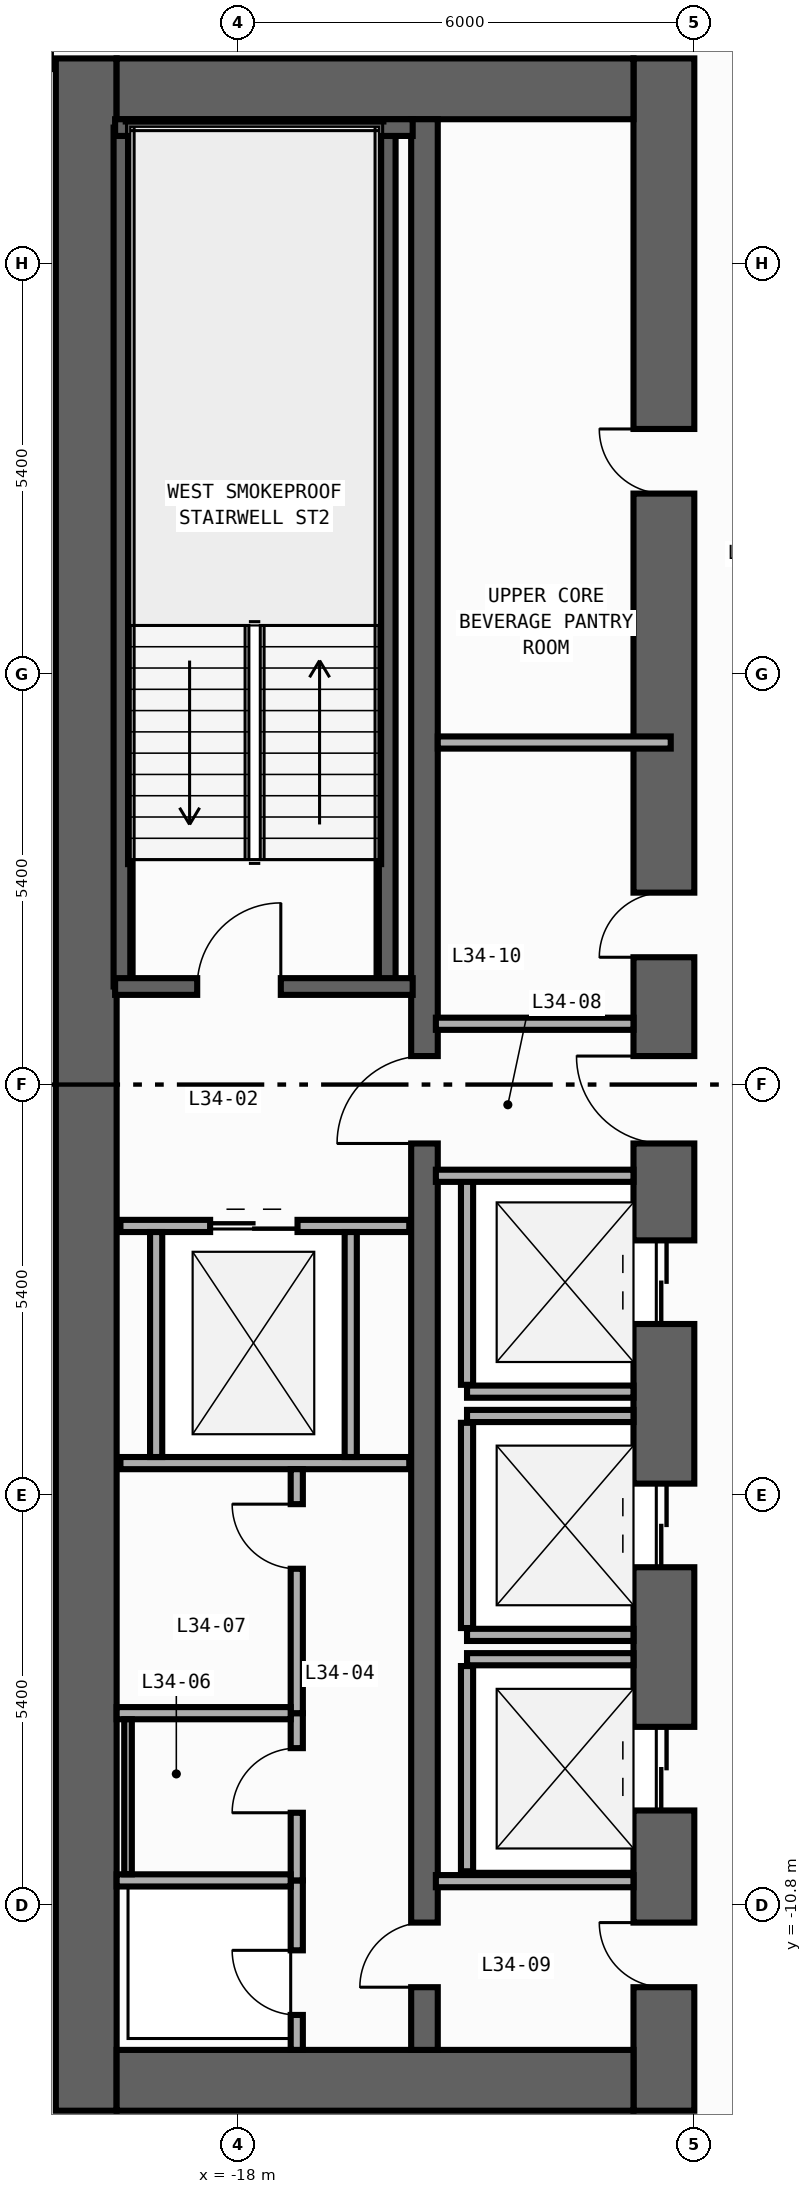
"""IFC4 building model, lengths in metres.
Left out: names, types, materials, properties, quantities, classifications, styles, units other than length and angle.
Written with IfcOpenShell. Run it as: python <this file> out.ifc"""

import sys

from ifc_helpers import new_model, si_unit, direction, frame, frame_2d, origin, place, context, subcontext, project, spatial, rectangle, extrude, element, fill, save


model = new_model("IFC4")
c1 = context("Model", 3, precision=1e-05, world=origin(), true_north=direction((0.0, 1.0)))
c2 = subcontext(c1, "Body", "Model", "MODEL_VIEW")
j1 = project(units=[si_unit("LENGTHUNIT", "METRE"), si_unit("PLANEANGLEUNIT", "RADIAN")], contexts=[c1])
p1 = place(None, origin())
s1 = spatial("IfcSite", under=j1, at=p1, CompositionType="ELEMENT")
p2 = place(p1, origin())
s2 = spatial("IfcBuilding", under=s1, at=p2, CompositionType="ELEMENT")
p3 = place(p2, frame((0.0, 0.0, 147.8)))
s3 = spatial("IfcBuildingStorey", under=s2, at=p3, CompositionType="ELEMENT", Elevation=147.8)
p4 = place(p3, frame((-20.0, -13.5, 0.0), z_axis=(0.0, 0.0, 1.0), x_axis=(0.0, 1.0, 0.0)))
e1 = element("IfcWall", 1, at=p4, inside=s3, PredefinedType="SHEAR", context=c2, shape_type="SweptSolid", body=[
    extrude(rectangle(XDim=27.0, YDim=0.8, at=frame_2d((13.5, 0.0))), origin(), (0.0, 0.0, 1.0), 3.85),
])
p5 = place(p3, frame((-12.4, -13.5, 0.0), z_axis=(0.0, 0.0, 1.0), x_axis=(0.0, 1.0, 0.0)))
e2 = element("IfcWall", 2, at=p5, inside=s3, PredefinedType="SHEAR", context=c2, shape_type="SweptSolid", body=[
    extrude(rectangle(XDim=27.0, YDim=0.8, at=frame_2d((13.5, 0.0))), origin(), (0.0, 0.0, 1.0), 3.85),
])
p6 = place(p5, frame((10.35, 0.0, 0.0)))
e3 = element("IfcOpeningElement", 3, at=p6, cuts=e2, PredefinedType="OPENING", context=c2, shape_type="SweptSolid", body=[
    extrude(rectangle(XDim=1.1, YDim=2.2, at=frame_2d((0.55, 1.1))), frame((0.0, 0.41, 0.0), z_axis=(0.0, -1.0, 0.0), x_axis=(1.0, 0.0, 0.0)), (0.0, 0.0, 1.0), 0.82),
])
p7 = place(p5, frame((7.15, 0.0, 0.0)))
e4 = element("IfcOpeningElement", 4, at=p7, cuts=e2, PredefinedType="OPENING", context=c2, shape_type="SweptSolid", body=[
    extrude(rectangle(XDim=1.1, YDim=2.2, at=frame_2d((0.55, 1.1))), frame((0.0, 0.41, 0.0), z_axis=(0.0, -1.0, 0.0), x_axis=(1.0, 0.0, 0.0)), (0.0, 0.0, 1.0), 0.82),
])
p8 = place(p5, frame((3.95, 0.0, 0.0)))
e5 = element("IfcOpeningElement", 5, at=p8, cuts=e2, PredefinedType="OPENING", context=c2, shape_type="SweptSolid", body=[
    extrude(rectangle(XDim=1.1, YDim=2.2, at=frame_2d((0.55, 1.1))), frame((0.0, 0.41, 0.0), z_axis=(0.0, -1.0, 0.0), x_axis=(1.0, 0.0, 0.0)), (0.0, 0.0, 1.0), 0.82),
])
p9 = place(p5, frame((15.175, 0.0, 0.0)))
e6 = element("IfcOpeningElement", 6, at=p9, cuts=e2, PredefinedType="OPENING", context=c2, shape_type="SweptSolid", body=[
    extrude(rectangle(XDim=0.85, YDim=2.1, at=frame_2d((0.425, 1.05))), frame((0.0, 0.41, 0.0), z_axis=(0.0, -1.0, 0.0), x_axis=(1.0, 0.0, 0.0)), (0.0, 0.0, 1.0), 0.82),
])
p10 = place(p5, frame((21.275, 0.0, 0.0)))
e7 = element("IfcOpeningElement", 7, at=p10, cuts=e2, PredefinedType="OPENING", context=c2, shape_type="SweptSolid", body=[
    extrude(rectangle(XDim=0.85, YDim=2.1, at=frame_2d((0.425, 1.05))), frame((0.0, 0.41, 0.0), z_axis=(0.0, -1.0, 0.0), x_axis=(1.0, 0.0, 0.0)), (0.0, 0.0, 1.0), 0.82),
])
p11 = place(p5, frame((12.725, 0.0, 0.0)))
e8 = element("IfcOpeningElement", 8, at=p11, cuts=e2, PredefinedType="OPENING", context=c2, shape_type="SweptSolid", body=[
    extrude(rectangle(XDim=1.15, YDim=2.2, at=frame_2d((0.575, 1.1))), frame((0.0, 0.41, 0.0), z_axis=(0.0, -1.0, 0.0), x_axis=(1.0, 0.0, 0.0)), (0.0, 0.0, 1.0), 0.82),
])
p12 = place(p5, frame((1.625, 0.0, 0.0)))
e9 = element("IfcOpeningElement", 9, at=p12, cuts=e2, PredefinedType="OPENING", context=c2, shape_type="SweptSolid", body=[
    extrude(rectangle(XDim=0.85, YDim=2.1, at=frame_2d((0.425, 1.05))), frame((0.0, 0.41, 0.0), z_axis=(0.0, -1.0, 0.0), x_axis=(1.0, 0.0, 0.0)), (0.0, 0.0, 1.0), 0.82),
])
for number, where, z_axis, x_axis in (
    (10, (-19.6, -13.1, 0.0), (0.0, 0.0, 1.0), (1.0, 0.0, 0.0)),
    (11, (-19.6, 13.1, 0.0), (0.0, 0.0, 1.0), (1.0, 0.0, 0.0)),
):
    element("IfcWall", number, at=place(p3, frame(where, z_axis=z_axis, x_axis=x_axis)), inside=s3, PredefinedType="SHEAR", context=c2, shape_type="SweptSolid", body=[
        extrude(rectangle(XDim=6.8, YDim=0.8, at=frame_2d((3.4, 0.0))), origin(), (0.0, 0.0, 1.0), 3.85),
    ])
p13 = place(p3, frame((-15.55, -12.7, 0.0), z_axis=(0.0, 0.0, 1.0), x_axis=(0.0, 1.0, 0.0)))
e12 = element("IfcWall", 12, at=p13, inside=s3, PredefinedType="SHEAR", context=c2, shape_type="SweptSolid", body=[
    extrude(rectangle(XDim=25.4, YDim=0.35, at=frame_2d((12.7, 0.0))), origin(), (0.0, 0.0, 1.0), 3.85),
])
p14 = place(p13, frame((11.925, 0.0, 0.0)))
e13 = element("IfcOpeningElement", 13, at=p14, cuts=e12, PredefinedType="OPENING", context=c2, shape_type="SweptSolid", body=[
    extrude(rectangle(XDim=1.15, YDim=2.2, at=frame_2d((0.575, 1.1))), frame((0.0, 0.185, 0.0), z_axis=(0.0, -1.0, 0.0), x_axis=(1.0, 0.0, 0.0)), (0.0, 0.0, 1.0), 0.37),
])
p15 = place(p13, frame((0.825, 0.0, 0.0)))
e14 = element("IfcOpeningElement", 14, at=p15, cuts=e12, PredefinedType="OPENING", context=c2, shape_type="SweptSolid", body=[
    extrude(rectangle(XDim=0.85, YDim=2.1, at=frame_2d((0.425, 1.05))), frame((0.0, 0.185, 0.0), z_axis=(0.0, -1.0, 0.0), x_axis=(1.0, 0.0, 0.0)), (0.0, 0.0, 1.0), 0.37),
])
for number, where, z_axis, x_axis in (
    (15, (-16.04, 1.29, 0.0), (0.0, 0.0, 1.0), (0.0, 1.0, 0.0)),
    (16, (-19.53, 1.29, 0.0), (0.0, 0.0, 1.0), (0.0, 1.0, 0.0)),
):
    element("IfcWall", number, at=place(p3, frame(where, z_axis=z_axis, x_axis=x_axis)), inside=s3, PredefinedType="SHEAR", context=c2, shape_type="SweptSolid", body=[
        extrude(rectangle(XDim=11.3, YDim=0.22, at=frame_2d((5.65, 0.0))), origin(), (0.0, 0.0, 1.0), 3.85),
    ])
p16 = place(p3, frame((-19.62, 12.59, 0.0), z_axis=(0.0, 0.0, 1.0), x_axis=(1.0, 0.0, 0.0)))
e17 = element("IfcWall", 17, at=p16, inside=s3, PredefinedType="SHEAR", context=c2, shape_type="SweptSolid", body=[
    extrude(rectangle(XDim=3.915, YDim=0.22, at=frame_2d((1.958, 0.0))), origin(), (0.0, 0.0, 1.0), 3.85),
])
p17 = place(p3, frame((-19.62, 1.29, 0.0), z_axis=(0.0, 0.0, 1.0), x_axis=(1.0, 0.0, 0.0)))
e18 = element("IfcWall", 18, at=p17, inside=s3, PredefinedType="SHEAR", context=c2, shape_type="SweptSolid", body=[
    extrude(rectangle(XDim=3.915, YDim=0.22, at=frame_2d((1.958, 0.0))), origin(), (0.0, 0.0, 1.0), 3.85),
])
p18 = place(p17, frame((1.08, 0.0, 0.0)))
e19 = element("IfcOpeningElement", 19, at=p18, cuts=e18, PredefinedType="OPENING", context=c2, shape_type="SweptSolid", body=[
    extrude(rectangle(XDim=1.1, YDim=2.2, at=frame_2d((0.55, 1.1))), frame((0.0, 0.12, 0.0), z_axis=(0.0, -1.0, 0.0), x_axis=(1.0, 0.0, 0.0)), (0.0, 0.0, 1.0), 0.24),
])
p19 = place(p3, frame((-14.99, -4.04, 0.0), z_axis=(0.0, 0.0, 1.0), x_axis=(1.0, 0.0, 0.0)))
e20 = element("IfcWall", 20, at=p19, inside=s3, PredefinedType="STANDARD", context=c2, shape_type="SweptSolid", body=[
    extrude(rectangle(XDim=2.19, YDim=0.16, at=frame_2d((1.095, 0.0))), origin(), (0.0, 0.0, 1.0), 3.85),
])
p20 = place(p3, frame((-14.99, -3.95, 0.0), z_axis=(0.0, 0.0, 1.0), x_axis=(0.0, 1.0, 0.0)))
e21 = element("IfcWall", 21, at=p20, inside=s3, PredefinedType="STANDARD", context=c2, shape_type="SweptSolid", body=[
    extrude(rectangle(XDim=2.7, YDim=0.16, at=frame_2d((1.35, 0.0))), origin(), (0.0, 0.0, 1.0), 3.85),
])
for number, where, z_axis, x_axis in (
    (22, (-14.99, -7.24, 0.0), (0.0, 0.0, 1.0), (1.0, 0.0, 0.0)),
    (23, (-14.99, -4.36, 0.0), (0.0, 0.0, 1.0), (1.0, 0.0, 0.0)),
):
    element("IfcWall", number, at=place(p3, frame(where, z_axis=z_axis, x_axis=x_axis)), inside=s3, PredefinedType="STANDARD", context=c2, shape_type="SweptSolid", body=[
        extrude(rectangle(XDim=2.19, YDim=0.16, at=frame_2d((1.095, 0.0))), origin(), (0.0, 0.0, 1.0), 3.85),
    ])
p21 = place(p3, frame((-14.99, -7.15, 0.0), z_axis=(0.0, 0.0, 1.0), x_axis=(0.0, 1.0, 0.0)))
e24 = element("IfcWall", 24, at=p21, inside=s3, PredefinedType="STANDARD", context=c2, shape_type="SweptSolid", body=[
    extrude(rectangle(XDim=2.7, YDim=0.16, at=frame_2d((1.35, 0.0))), origin(), (0.0, 0.0, 1.0), 3.85),
])
p22 = place(p3, frame((-14.99, -7.56, 0.0), z_axis=(0.0, 0.0, 1.0), x_axis=(1.0, 0.0, 0.0)))
e25 = element("IfcWall", 25, at=p22, inside=s3, PredefinedType="STANDARD", context=c2, shape_type="SweptSolid", body=[
    extrude(rectangle(XDim=2.19, YDim=0.16, at=frame_2d((1.095, 0.0))), origin(), (0.0, 0.0, 1.0), 3.85),
])
p23 = place(p3, frame((-14.99, -10.35, 0.0), z_axis=(0.0, 0.0, 1.0), x_axis=(0.0, 1.0, 0.0)))
e26 = element("IfcWall", 26, at=p23, inside=s3, PredefinedType="STANDARD", context=c2, shape_type="SweptSolid", body=[
    extrude(rectangle(XDim=2.7, YDim=0.16, at=frame_2d((1.35, 0.0))), origin(), (0.0, 0.0, 1.0), 3.85),
])
p24 = place(p3, frame((-19.55, -1.86, 0.0), z_axis=(0.0, 0.0, 1.0), x_axis=(1.0, 0.0, 0.0)))
e27 = element("IfcWall", 27, at=p24, inside=s3, PredefinedType="STANDARD", context=c2, shape_type="SweptSolid", body=[
    extrude(rectangle(XDim=3.8, YDim=0.16, at=frame_2d((1.9, 0.0))), origin(), (0.0, 0.0, 1.0), 3.85),
])
p25 = place(p24, frame((1.18, 0.0, 0.0)))
e28 = element("IfcOpeningElement", 28, at=p25, cuts=e27, PredefinedType="OPENING", context=c2, shape_type="SweptSolid", body=[
    extrude(rectangle(XDim=1.15, YDim=2.2, at=frame_2d((0.575, 1.1))), frame((0.0, 0.09, 0.0), z_axis=(0.0, -1.0, 0.0), x_axis=(1.0, 0.0, 0.0)), (0.0, 0.0, 1.0), 0.18),
])
p26 = place(p3, frame((-19.55, -4.98, 0.0), z_axis=(0.0, 0.0, 1.0), x_axis=(1.0, 0.0, 0.0)))
e29 = element("IfcWall", 29, at=p26, inside=s3, PredefinedType="STANDARD", context=c2, shape_type="SweptSolid", body=[
    extrude(rectangle(XDim=3.8, YDim=0.16, at=frame_2d((1.9, 0.0))), origin(), (0.0, 0.0, 1.0), 3.85),
])
for number, where, z_axis, x_axis in (
    (30, (-19.08, -4.9, 0.0), (0.0, 0.0, 1.0), (0.0, 1.0, 0.0)),
    (31, (-16.52, -4.9, 0.0), (0.0, 0.0, 1.0), (0.0, 1.0, 0.0)),
):
    element("IfcWall", number, at=place(p3, frame(where, z_axis=z_axis, x_axis=x_axis)), inside=s3, PredefinedType="STANDARD", context=c2, shape_type="SweptSolid", body=[
        extrude(rectangle(XDim=2.96, YDim=0.16, at=frame_2d((1.48, 0.0))), origin(), (0.0, 0.0, 1.0), 3.85),
    ])
for number, where, z_axis, x_axis in (
    (32, (-15.4, 0.8, 0.0), (0.0, 0.0, 1.0), (1.0, 0.0, 0.0)),
    (33, (-15.4, -1.2, 0.0), (0.0, 0.0, 1.0), (1.0, 0.0, 0.0)),
    (34, (-15.4, -10.48, 0.0), (0.0, 0.0, 1.0), (1.0, 0.0, 0.0)),
):
    element("IfcWall", number, at=place(p3, frame(where, z_axis=z_axis, x_axis=x_axis)), inside=s3, PredefinedType="STANDARD", context=c2, shape_type="SweptSolid", body=[
        extrude(rectangle(XDim=2.6, YDim=0.16, at=frame_2d((1.3, 0.0))), origin(), (0.0, 0.0, 1.0), 3.85),
    ])
p27 = place(p3, frame((-17.23, -12.7, 0.0), z_axis=(0.0, 0.0, 1.0), x_axis=(0.0, 1.0, 0.0)))
e35 = element("IfcWall", 35, at=p27, inside=s3, PredefinedType="PARTITIONING", context=c2, shape_type="SweptSolid", body=[
    extrude(rectangle(XDim=2.23, YDim=0.16, at=frame_2d((1.115, 0.0))), origin(), (0.0, 0.0, 1.0), 3.85),
])
p28 = place(p27, frame((0.46, 0.0, 0.0)))
e36 = element("IfcOpeningElement", 36, at=p28, cuts=e35, PredefinedType="OPENING", context=c2, shape_type="SweptSolid", body=[
    extrude(rectangle(XDim=0.85, YDim=2.1, at=frame_2d((0.425, 1.05))), frame((0.0, 0.09, 0.0), z_axis=(0.0, -1.0, 0.0), x_axis=(1.0, 0.0, 0.0)), (0.0, 0.0, 1.0), 0.18),
])
p29 = place(p3, frame((-17.23, -10.47, 0.0), z_axis=(0.0, 0.0, 1.0), x_axis=(0.0, 1.0, 0.0)))
e37 = element("IfcWall", 37, at=p29, inside=s3, PredefinedType="PARTITIONING", context=c2, shape_type="SweptSolid", body=[
    extrude(rectangle(XDim=2.2, YDim=0.16, at=frame_2d((1.1, 0.0))), origin(), (0.0, 0.0, 1.0), 3.85),
])
p30 = place(p29, frame((0.89, 0.0, 0.0)))
e38 = element("IfcOpeningElement", 38, at=p30, cuts=e37, PredefinedType="OPENING", context=c2, shape_type="SweptSolid", body=[
    extrude(rectangle(XDim=0.85, YDim=2.1, at=frame_2d((0.425, 1.05))), frame((0.0, 0.09, 0.0), z_axis=(0.0, -1.0, 0.0), x_axis=(1.0, 0.0, 0.0)), (0.0, 0.0, 1.0), 0.18),
])
p31 = place(p3, frame((-17.23, -8.27, 0.0), z_axis=(0.0, 0.0, 1.0), x_axis=(0.0, 1.0, 0.0)))
e39 = element("IfcWall", 39, at=p31, inside=s3, PredefinedType="PARTITIONING", context=c2, shape_type="SweptSolid", body=[
    extrude(rectangle(XDim=3.21, YDim=0.16, at=frame_2d((1.605, 0.0))), origin(), (0.0, 0.0, 1.0), 3.85),
])
p32 = place(p31, frame((1.9, 0.0, 0.0)))
e40 = element("IfcOpeningElement", 40, at=p32, cuts=e39, PredefinedType="OPENING", context=c2, shape_type="SweptSolid", body=[
    extrude(rectangle(XDim=0.85, YDim=2.1, at=frame_2d((0.425, 1.05))), frame((0.0, 0.09, 0.0), z_axis=(0.0, -1.0, 0.0), x_axis=(1.0, 0.0, 0.0)), (0.0, 0.0, 1.0), 0.18),
])
for number, where, z_axis, x_axis in (
    (41, (-19.6, -10.47, 0.0), (0.0, 0.0, 1.0), (1.0, 0.0, 0.0)),
    (42, (-19.6, -8.27, 0.0), (0.0, 0.0, 1.0), (1.0, 0.0, 0.0)),
):
    element("IfcWall", number, at=place(p3, frame(where, z_axis=z_axis, x_axis=x_axis)), inside=s3, PredefinedType="PARTITIONING", context=c2, shape_type="SweptSolid", body=[
        extrude(rectangle(XDim=2.29, YDim=0.16, at=frame_2d((1.145, 0.0))), origin(), (0.0, 0.0, 1.0), 3.85),
    ])
p33 = place(p3, frame((-15.375, 4.5, 0.0), z_axis=(0.0, 0.0, 1.0), x_axis=(1.0, 0.0, 0.0)))
e43 = element("IfcWall", 43, at=p33, inside=s3, PredefinedType="PARTITIONING", context=c2, shape_type="SweptSolid", body=[
    extrude(rectangle(XDim=3.065, YDim=0.16, at=frame_2d((1.532, 0.0))), origin(), (0.0, 0.0, 1.0), 3.85),
])
p34 = place(p3, frame((-19.45, -10.39, 0.0), z_axis=(0.0, 0.0, 1.0), x_axis=(0.0, 1.0, 0.0)))
e44 = element("IfcWall", 44, at=p34, inside=s3, PredefinedType="PARTITIONING", context=c2, shape_type="SweptSolid", body=[
    extrude(rectangle(XDim=2.04, YDim=0.1, at=frame_2d((1.02, 0.0))), origin(), (0.0, 0.0, 1.0), 3.85),
])
p35 = place(p18, origin())
e45 = element("IfcDoor", 45, at=p35, inside=s3, OperationType="SINGLE_SWING_RIGHT", PredefinedType="DOOR", context=c2, shape_type="SweptSolid", body=[
    extrude(rectangle(XDim=1.1, YDim=2.2, at=frame_2d((0.55, 1.1))), frame((0.0, 0.025, 0.0), z_axis=(0.0, -1.0, 0.0), x_axis=(1.0, 0.0, 0.0)), (0.0, 0.0, 1.0), 0.05),
])
fill(e19, e45)
p36 = place(p6, origin())
e46 = element("IfcDoor", 46, at=p36, inside=s3, OperationType="DOUBLE_DOOR_SLIDING", PredefinedType="DOOR", context=c2, shape_type="SweptSolid", body=[
    extrude(rectangle(XDim=1.1, YDim=2.2, at=frame_2d((0.55, 1.1))), frame((0.0, 0.025, 0.0), z_axis=(0.0, -1.0, 0.0), x_axis=(1.0, 0.0, 0.0)), (0.0, 0.0, 1.0), 0.05),
])
fill(e3, e46)
p37 = place(p7, origin())
e47 = element("IfcDoor", 47, at=p37, inside=s3, OperationType="DOUBLE_DOOR_SLIDING", PredefinedType="DOOR", context=c2, shape_type="SweptSolid", body=[
    extrude(rectangle(XDim=1.1, YDim=2.2, at=frame_2d((0.55, 1.1))), frame((0.0, 0.025, 0.0), z_axis=(0.0, -1.0, 0.0), x_axis=(1.0, 0.0, 0.0)), (0.0, 0.0, 1.0), 0.05),
])
fill(e4, e47)
p38 = place(p8, origin())
e48 = element("IfcDoor", 48, at=p38, inside=s3, OperationType="DOUBLE_DOOR_SLIDING", PredefinedType="DOOR", context=c2, shape_type="SweptSolid", body=[
    extrude(rectangle(XDim=1.1, YDim=2.2, at=frame_2d((0.55, 1.1))), frame((0.0, 0.025, 0.0), z_axis=(0.0, -1.0, 0.0), x_axis=(1.0, 0.0, 0.0)), (0.0, 0.0, 1.0), 0.05),
])
fill(e5, e48)
p39 = place(p9, origin())
e49 = element("IfcDoor", 49, at=p39, inside=s3, OperationType="SINGLE_SWING_LEFT", PredefinedType="DOOR", context=c2, shape_type="SweptSolid", body=[
    extrude(rectangle(XDim=0.85, YDim=2.1, at=frame_2d((0.425, 1.05))), frame((0.0, 0.025, 0.0), z_axis=(0.0, -1.0, 0.0), x_axis=(1.0, 0.0, 0.0)), (0.0, 0.0, 1.0), 0.05),
])
fill(e6, e49)
p40 = place(p10, origin())
e50 = element("IfcDoor", 50, at=p40, inside=s3, OperationType="SINGLE_SWING_RIGHT", PredefinedType="DOOR", context=c2, shape_type="SweptSolid", body=[
    extrude(rectangle(XDim=0.85, YDim=2.1, at=frame_2d((0.425, 1.05))), frame((0.0, 0.025, 0.0), z_axis=(0.0, -1.0, 0.0), x_axis=(1.0, 0.0, 0.0)), (0.0, 0.0, 1.0), 0.05),
])
fill(e7, e50)
p41 = place(p11, origin())
e51 = element("IfcDoor", 51, at=p41, inside=s3, OperationType="SINGLE_SWING_RIGHT", PredefinedType="DOOR", context=c2, shape_type="SweptSolid", body=[
    extrude(rectangle(XDim=1.15, YDim=2.2, at=frame_2d((0.575, 1.1))), frame((0.0, 0.025, 0.0), z_axis=(0.0, -1.0, 0.0), x_axis=(1.0, 0.0, 0.0)), (0.0, 0.0, 1.0), 0.05),
])
fill(e8, e51)
p42 = place(p14, origin())
e52 = element("IfcDoor", 52, at=p42, inside=s3, OperationType="SINGLE_SWING_LEFT", PredefinedType="DOOR", context=c2, shape_type="SweptSolid", body=[
    extrude(rectangle(XDim=1.15, YDim=2.2, at=frame_2d((0.575, 1.1))), frame((0.0, 0.025, 0.0), z_axis=(0.0, -1.0, 0.0), x_axis=(1.0, 0.0, 0.0)), (0.0, 0.0, 1.0), 0.05),
])
fill(e13, e52)
p43 = place(p12, origin())
e53 = element("IfcDoor", 53, at=p43, inside=s3, OperationType="SINGLE_SWING_RIGHT", PredefinedType="DOOR", context=c2, shape_type="SweptSolid", body=[
    extrude(rectangle(XDim=0.85, YDim=2.1, at=frame_2d((0.425, 1.05))), frame((0.0, 0.025, 0.0), z_axis=(0.0, -1.0, 0.0), x_axis=(1.0, 0.0, 0.0)), (0.0, 0.0, 1.0), 0.05),
])
fill(e9, e53)
p44 = place(p15, origin())
e54 = element("IfcDoor", 54, at=p44, inside=s3, OperationType="SINGLE_SWING_LEFT", PredefinedType="DOOR", context=c2, shape_type="SweptSolid", body=[
    extrude(rectangle(XDim=0.85, YDim=2.1, at=frame_2d((0.425, 1.05))), frame((0.0, 0.025, 0.0), z_axis=(0.0, -1.0, 0.0), x_axis=(1.0, 0.0, 0.0)), (0.0, 0.0, 1.0), 0.05),
])
fill(e14, e54)
p45 = place(p25, origin())
e55 = element("IfcDoor", 55, at=p45, inside=s3, OperationType="DOUBLE_DOOR_SLIDING", PredefinedType="DOOR", context=c2, shape_type="SweptSolid", body=[
    extrude(rectangle(XDim=1.15, YDim=2.2, at=frame_2d((0.575, 1.1))), frame((0.0, 0.025, 0.0), z_axis=(0.0, -1.0, 0.0), x_axis=(1.0, 0.0, 0.0)), (0.0, 0.0, 1.0), 0.05),
])
fill(e28, e55)
p46 = place(p28, origin())
e56 = element("IfcDoor", 56, at=p46, inside=s3, OperationType="SINGLE_SWING_RIGHT", PredefinedType="DOOR", context=c2, shape_type="SweptSolid", body=[
    extrude(rectangle(XDim=0.85, YDim=2.1, at=frame_2d((0.425, 1.05))), frame((0.0, 0.025, 0.0), z_axis=(0.0, -1.0, 0.0), x_axis=(1.0, 0.0, 0.0)), (0.0, 0.0, 1.0), 0.05),
])
fill(e36, e56)
p47 = place(p30, origin())
e57 = element("IfcDoor", 57, at=p47, inside=s3, OperationType="SINGLE_SWING_LEFT", PredefinedType="DOOR", context=c2, shape_type="SweptSolid", body=[
    extrude(rectangle(XDim=0.85, YDim=2.1, at=frame_2d((0.425, 1.05))), frame((0.0, 0.025, 0.0), z_axis=(0.0, -1.0, 0.0), x_axis=(1.0, 0.0, 0.0)), (0.0, 0.0, 1.0), 0.05),
])
fill(e38, e57)
p48 = place(p32, origin())
e58 = element("IfcDoor", 58, at=p48, inside=s3, OperationType="SINGLE_SWING_RIGHT", PredefinedType="DOOR", context=c2, shape_type="SweptSolid", body=[
    extrude(rectangle(XDim=0.85, YDim=2.1, at=frame_2d((0.425, 1.05))), frame((0.0, 0.025, 0.0), z_axis=(0.0, -1.0, 0.0), x_axis=(1.0, 0.0, 0.0)), (0.0, 0.0, 1.0), 0.05),
])
fill(e40, e58)
save(model, sys.argv[1])
